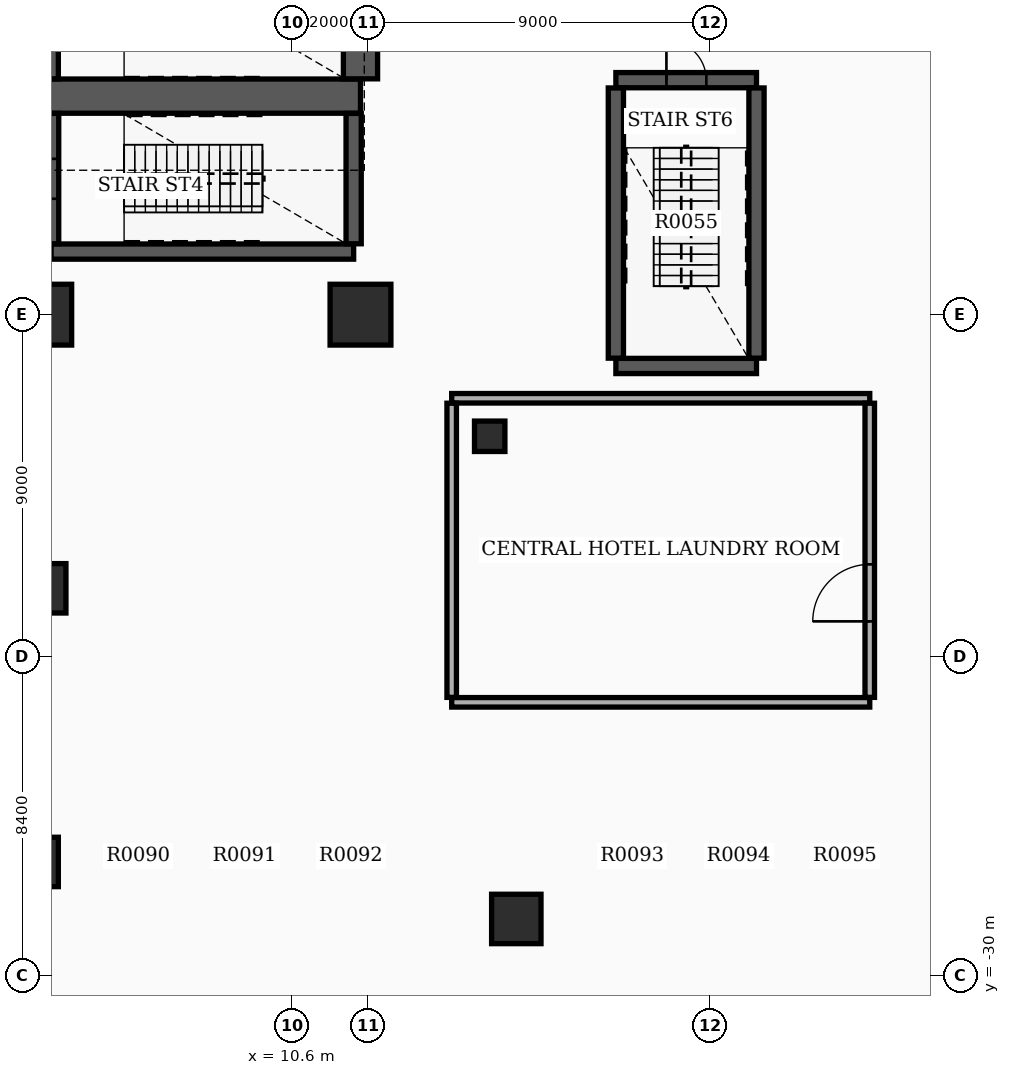
"""IFC4 building model, lengths in metres.
Left out: names, types, materials, properties, quantities, classifications, styles, units other than length and angle.
Written with IfcOpenShell. Run it as: python <this file> out.ifc"""

import sys

from ifc_helpers import new_model, si_unit, direction, frame, frame_2d, origin, origin_2d, place, context, subcontext, project, spatial, rectangle, circle, extrude, element, fill, save


model = new_model("IFC4")
c1 = context("Model", 3, precision=1e-05, world=origin(), true_north=direction((0.0, 1.0)))
c2 = subcontext(c1, "Body", "Model", "MODEL_VIEW")
j1 = project(units=[si_unit("LENGTHUNIT", "METRE"), si_unit("PLANEANGLEUNIT", "RADIAN")], contexts=[c1])
p1 = place(None, origin())
s1 = spatial("IfcSite", under=j1, at=p1, CompositionType="ELEMENT")
p2 = place(p1, origin())
s2 = spatial("IfcBuilding", under=s1, at=p2, CompositionType="ELEMENT")
p3 = place(p2, frame((0.0, 0.0, -5.2)))
s3 = spatial("IfcBuildingStorey", under=s2, at=p3, CompositionType="ELEMENT", Elevation=-5.2)
p4 = place(p3, frame((15.8, -15.8, 0.0), z_axis=(0.0, 0.0, 1.0), x_axis=(1.0, 0.0, 0.0)))
e1 = element("IfcColumn", 1, at=p4, inside=s3, PredefinedType="COLUMN", context=c2, shape_type="SweptSolid", body=[
    extrude(rectangle(XDim=0.8, YDim=0.8, at=origin_2d()), origin(), (0.0, 0.0, 1.0), 5.2),
])
p5 = place(p3, frame((4.0, -6.85, 0.0), z_axis=(0.0, 0.0, 1.0), x_axis=(1.0, 0.0, 0.0)))
e2 = element("IfcWall", 2, at=p5, inside=s3, PredefinedType="SHEAR", context=c2, shape_type="SweptSolid", body=[
    extrude(rectangle(XDim=8.4, YDim=0.9, at=frame_2d((4.2, 0.0))), origin(), (0.0, 0.0, 1.0), 4.95),
])
p6 = place(p3, frame((4.0, -6.395, 0.0), z_axis=(0.0, 0.0, 1.0), x_axis=(0.0, 1.0, 0.0)))
e3 = element("IfcWall", 3, at=p6, inside=s3, PredefinedType="SHEAR", context=c2, shape_type="SweptSolid", body=[
    extrude(rectangle(XDim=10.89, YDim=0.9, at=frame_2d((5.445, 0.0))), origin(), (0.0, 0.0, 1.0), 4.95),
])
p7 = place(p6, frame((1.145, 0.0, 0.0)))
e4 = element("IfcOpeningElement", 4, at=p7, cuts=e3, PredefinedType="OPENING", context=c2, shape_type="SweptSolid", body=[
    extrude(rectangle(XDim=1.05, YDim=2.15, at=frame_2d((0.525, 1.075))), frame((0.0, 0.46, 0.0), z_axis=(0.0, -1.0, 0.0), x_axis=(1.0, 0.0, 0.0)), (0.0, 0.0, 1.0), 0.92),
])
p8 = place(p6, frame((6.745, 0.0, 0.0)))
e5 = element("IfcOpeningElement", 5, at=p8, cuts=e3, PredefinedType="OPENING", context=c2, shape_type="SweptSolid", body=[
    extrude(rectangle(XDim=1.05, YDim=2.15, at=frame_2d((0.525, 1.075))), frame((0.0, 0.46, 0.0), z_axis=(0.0, -1.0, 0.0), x_axis=(1.0, 0.0, 0.0)), (0.0, 0.0, 1.0), 0.92),
])
p9 = place(p3, frame((12.4, -6.395, 0.0), z_axis=(0.0, 0.0, 1.0), x_axis=(0.0, 1.0, 0.0)))
e6 = element("IfcWall", 6, at=p9, inside=s3, PredefinedType="SHEAR", context=c2, shape_type="SweptSolid", body=[
    extrude(rectangle(XDim=10.89, YDim=0.9, at=frame_2d((5.445, 0.0))), origin(), (0.0, 0.0, 1.0), 4.95),
])
p10 = place(p3, frame((4.26, -10.94, 0.0), z_axis=(0.0, 0.0, 1.0), x_axis=(1.0, 0.0, 0.0)))
e7 = element("IfcWall", 7, at=p10, inside=s3, PredefinedType="SHEAR", context=c2, shape_type="SweptSolid", body=[
    extrude(rectangle(XDim=7.96, YDim=0.4, at=frame_2d((3.98, 0.0))), origin(), (0.0, 0.0, 1.0), 4.95),
])
p11 = place(p3, frame((4.26, -10.735, 0.0), z_axis=(0.0, 0.0, 1.0), x_axis=(0.0, 1.0, 0.0)))
e8 = element("IfcWall", 8, at=p11, inside=s3, PredefinedType="SHEAR", context=c2, shape_type="SweptSolid", body=[
    extrude(rectangle(XDim=3.43, YDim=0.4, at=frame_2d((1.715, 0.0))), origin(), (0.0, 0.0, 1.0), 4.95),
])
p12 = place(p11, frame((1.185, 0.0, 0.0)))
e9 = element("IfcOpeningElement", 9, at=p12, cuts=e8, PredefinedType="OPENING", context=c2, shape_type="SweptSolid", body=[
    extrude(rectangle(XDim=1.05, YDim=2.15, at=frame_2d((0.525, 1.075))), frame((0.0, 0.21, 0.0), z_axis=(0.0, -1.0, 0.0), x_axis=(1.0, 0.0, 0.0)), (0.0, 0.0, 1.0), 0.42),
])
p13 = place(p3, frame((12.22, -10.735, 0.0), z_axis=(0.0, 0.0, 1.0), x_axis=(0.0, 1.0, 0.0)))
e10 = element("IfcWall", 10, at=p13, inside=s3, PredefinedType="SHEAR", context=c2, shape_type="SweptSolid", body=[
    extrude(rectangle(XDim=3.43, YDim=0.4, at=frame_2d((1.715, 0.0))), origin(), (0.0, 0.0, 1.0), 4.95),
])
p14 = place(p3, frame((19.12, -6.43, 0.0), z_axis=(0.0, 0.0, 1.0), x_axis=(1.0, 0.0, 0.0)))
e11 = element("IfcWall", 11, at=p14, inside=s3, PredefinedType="SHEAR", context=c2, shape_type="SweptSolid", body=[
    extrude(rectangle(XDim=3.7, YDim=0.4, at=frame_2d((1.85, 0.0))), origin(), (0.0, 0.0, 1.0), 4.95),
])
p15 = place(p14, frame((1.33, 0.0, 0.0)))
e12 = element("IfcOpeningElement", 12, at=p15, cuts=e11, PredefinedType="OPENING", context=c2, shape_type="SweptSolid", body=[
    extrude(rectangle(XDim=1.05, YDim=2.15, at=frame_2d((0.525, 1.075))), frame((0.0, 0.21, 0.0), z_axis=(0.0, -1.0, 0.0), x_axis=(1.0, 0.0, 0.0)), (0.0, 0.0, 1.0), 0.42),
])
p16 = place(p3, frame((19.12, -13.95, 0.0), z_axis=(0.0, 0.0, 1.0), x_axis=(1.0, 0.0, 0.0)))
e13 = element("IfcWall", 13, at=p16, inside=s3, PredefinedType="SHEAR", context=c2, shape_type="SweptSolid", body=[
    extrude(rectangle(XDim=3.7, YDim=0.4, at=frame_2d((1.85, 0.0))), origin(), (0.0, 0.0, 1.0), 4.95),
])
for number, where, z_axis, x_axis in (
    (14, (19.12, -13.745, 0.0), (0.0, 0.0, 1.0), (0.0, 1.0, 0.0)),
    (15, (22.82, -13.745, 0.0), (0.0, 0.0, 1.0), (0.0, 1.0, 0.0)),
):
    element("IfcWall", number, at=place(p3, frame(where, z_axis=z_axis, x_axis=x_axis)), inside=s3, PredefinedType="SHEAR", context=c2, shape_type="SweptSolid", body=[
        extrude(rectangle(XDim=7.11, YDim=0.4, at=frame_2d((3.555, 0.0))), origin(), (0.0, 0.0, 1.0), 4.95),
    ])
for number, where, z_axis, x_axis in (
    (16, (12.4, -12.6, 0.0), (0.0, 0.0, 1.0), (1.0, 0.0, 0.0)),
    (17, (4.0, -12.6, 0.0), (0.0, 0.0, 1.0), (1.0, 0.0, 0.0)),
):
    element("IfcColumn", number, at=place(p3, frame(where, z_axis=z_axis, x_axis=x_axis)), inside=s3, PredefinedType="COLUMN", context=c2, shape_type="SweptSolid", body=[
        extrude(rectangle(XDim=1.6, YDim=1.6, at=origin_2d()), origin(), (0.0, 0.0, 1.0), 5.2),
    ])
for number, where, z_axis, x_axis in (
    (18, (4.0, -19.8, 0.0), (0.0, 0.0, 1.0), (1.0, 0.0, 0.0)),
    (19, (3.8, -27.0, 0.0), (0.0, 0.0, 1.0), (1.0, 0.0, 0.0)),
):
    element("IfcColumn", number, at=place(p3, frame(where, z_axis=z_axis, x_axis=x_axis)), inside=s3, PredefinedType="COLUMN", context=c2, shape_type="SweptSolid", body=[
        extrude(rectangle(XDim=1.3, YDim=1.3, at=origin_2d()), origin(), (0.0, 0.0, 1.0), 5.2),
    ])
p17 = place(p3, frame((16.5, -28.5, 0.0), z_axis=(0.0, 0.0, 1.0), x_axis=(1.0, 0.0, 0.0)))
e20 = element("IfcColumn", 20, at=p17, inside=s3, PredefinedType="COLUMN", context=c2, shape_type="SweptSolid", body=[
    extrude(circle(Radius=0.65, at=origin_2d()), origin(), (0.0, 0.0, 1.0), 5.2),
])
for number, where, z_axis, x_axis in (
    (21, (14.8, -22.8, 0.0), (0.0, 0.0, 1.0), (1.0, 0.0, 0.0)),
    (22, (14.8, -14.8, 0.0), (0.0, 0.0, 1.0), (1.0, 0.0, 0.0)),
):
    element("IfcWall", number, at=place(p3, frame(where, z_axis=z_axis, x_axis=x_axis)), inside=s3, PredefinedType="SOLIDWALL", context=c2, shape_type="SweptSolid", body=[
        extrude(rectangle(XDim=11.0, YDim=0.25, at=frame_2d((5.5, 0.0))), origin(), (0.0, 0.0, 1.0), 3.97),
    ])
p18 = place(p3, frame((14.8, -22.67, 0.0), z_axis=(0.0, 0.0, 1.0), x_axis=(0.0, 1.0, 0.0)))
e23 = element("IfcWall", 23, at=p18, inside=s3, PredefinedType="SOLIDWALL", context=c2, shape_type="SweptSolid", body=[
    extrude(rectangle(XDim=7.74, YDim=0.25, at=frame_2d((3.87, 0.0))), origin(), (0.0, 0.0, 1.0), 3.97),
])
p19 = place(p3, frame((25.8, -22.67, 0.0), z_axis=(0.0, 0.0, 1.0), x_axis=(0.0, 1.0, 0.0)))
e24 = element("IfcWall", 24, at=p19, inside=s3, PredefinedType="SOLIDWALL", context=c2, shape_type="SweptSolid", body=[
    extrude(rectangle(XDim=7.74, YDim=0.25, at=frame_2d((3.87, 0.0))), origin(), (0.0, 0.0, 1.0), 3.97),
])
p20 = place(p19, frame((2.0, 0.0, 0.0)))
e25 = element("IfcOpeningElement", 25, at=p20, cuts=e24, PredefinedType="OPENING", context=c2, shape_type="SweptSolid", body=[
    extrude(rectangle(XDim=1.5, YDim=2.15, at=frame_2d((0.75, 1.075))), frame((0.0, 0.135, 0.0), z_axis=(0.0, -1.0, 0.0), x_axis=(1.0, 0.0, 0.0)), (0.0, 0.0, 1.0), 0.27),
])
p21 = place(p15, origin())
e26 = element("IfcDoor", 26, at=p21, inside=s3, OperationType="SINGLE_SWING_LEFT", PredefinedType="DOOR", context=c2, shape_type="SweptSolid", body=[
    extrude(rectangle(XDim=1.05, YDim=2.15, at=frame_2d((0.525, 1.075))), frame((0.0, 0.025, 0.0), z_axis=(0.0, -1.0, 0.0), x_axis=(1.0, 0.0, 0.0)), (0.0, 0.0, 1.0), 0.05),
])
fill(e12, e26)
p22 = place(p20, origin())
e27 = element("IfcDoor", 27, at=p22, inside=s3, OperationType="DOUBLE_DOOR_SINGLE_SWING", PredefinedType="DOOR", context=c2, shape_type="SweptSolid", body=[
    extrude(rectangle(XDim=1.5, YDim=2.15, at=frame_2d((0.75, 1.075))), frame((0.0, 0.025, 0.0), z_axis=(0.0, -1.0, 0.0), x_axis=(1.0, 0.0, 0.0)), (0.0, 0.0, 1.0), 0.05),
])
fill(e25, e27)
save(model, sys.argv[1])
